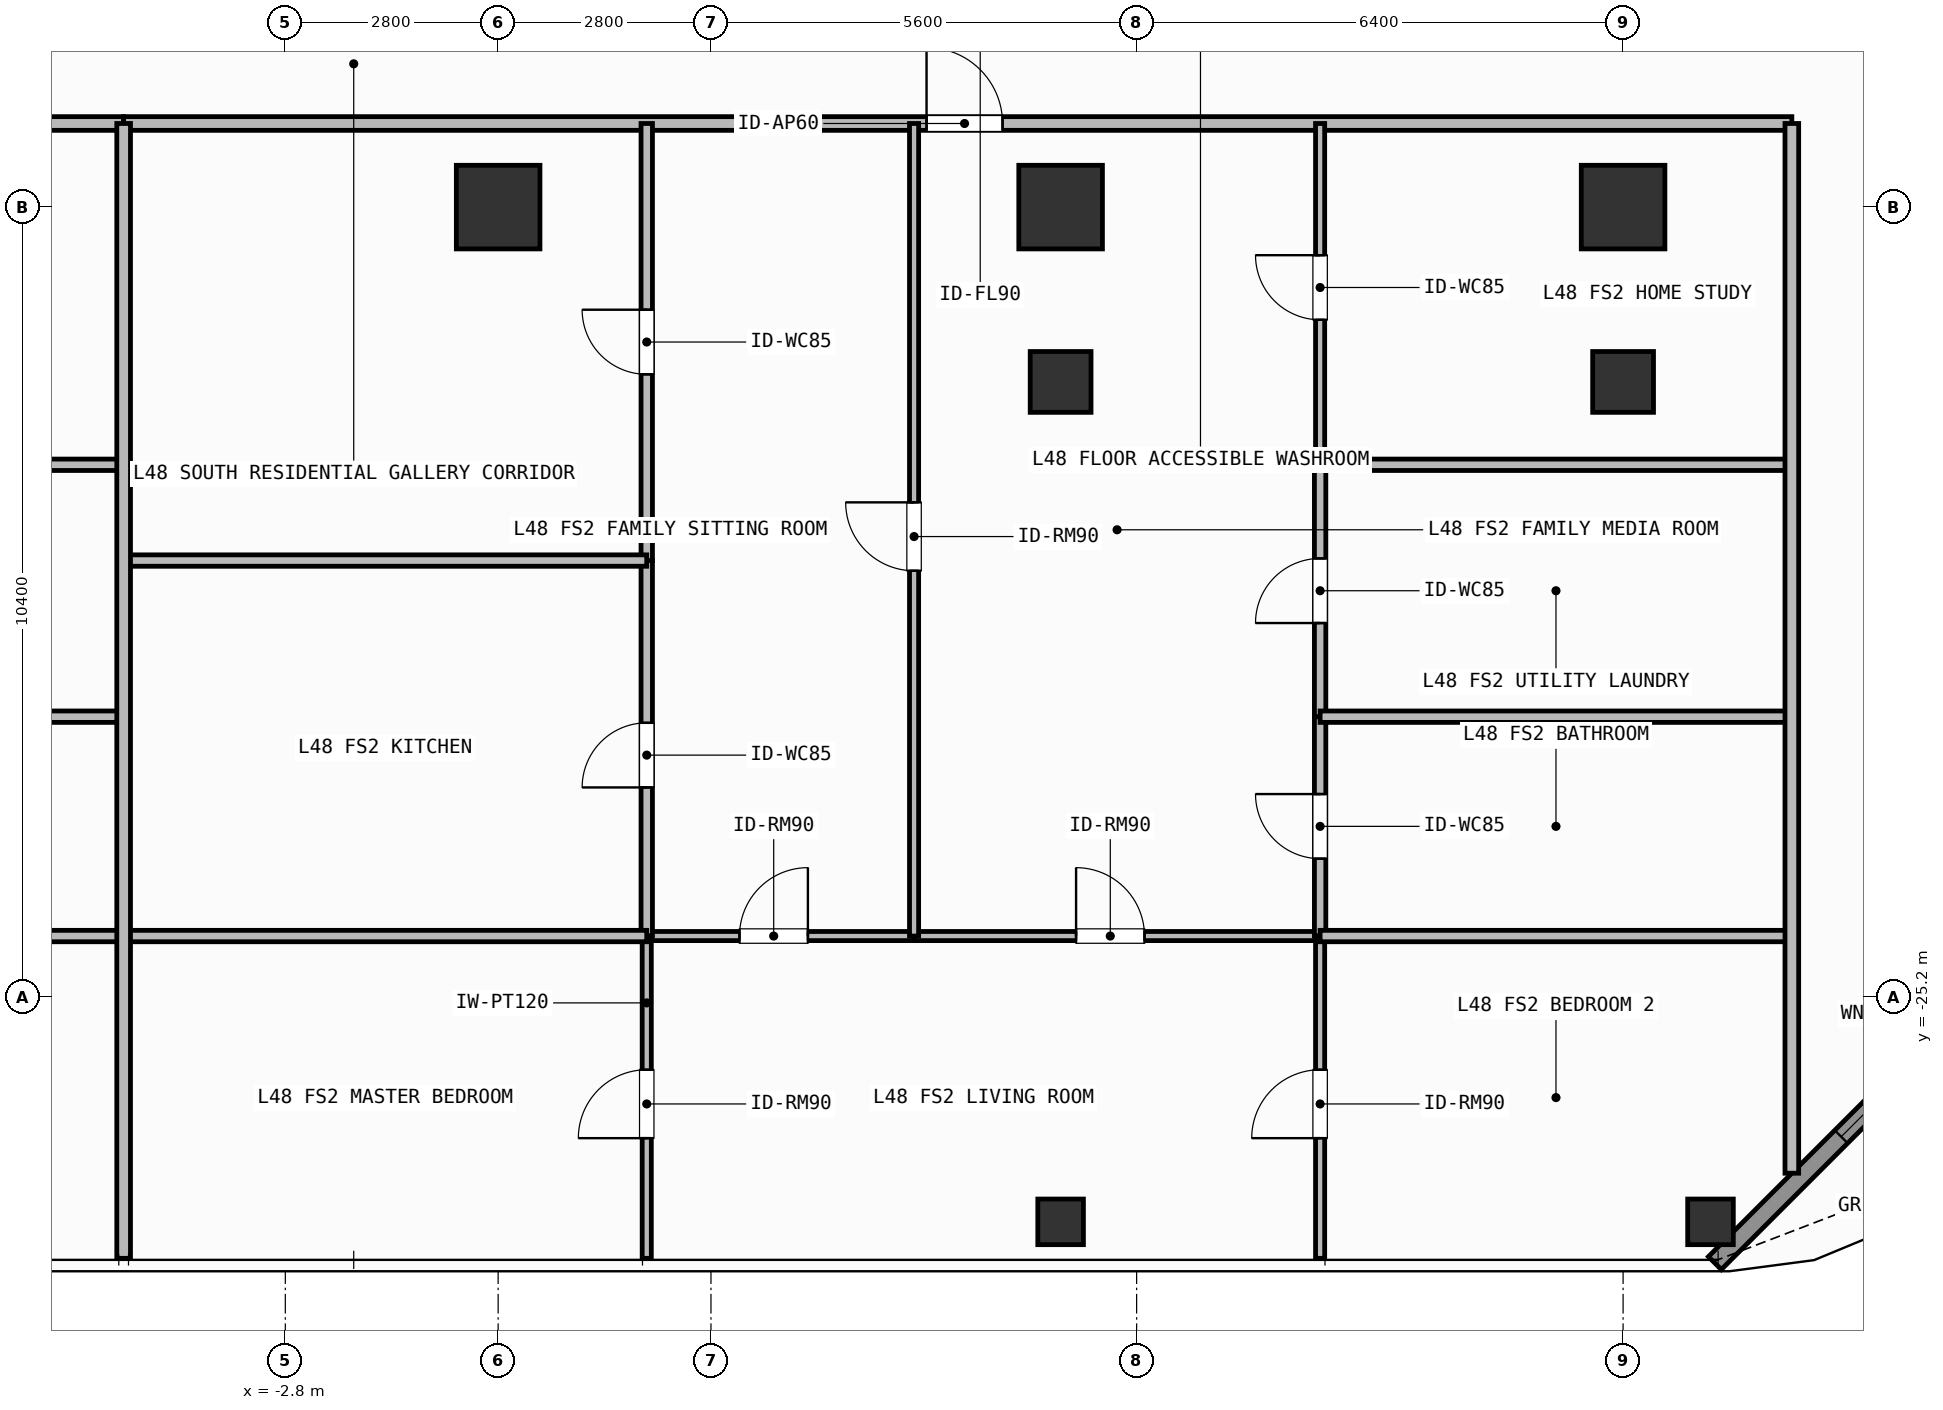
"""IFC4 building model, lengths in metres.
Left out: names, types, materials, properties, quantities, classifications, styles, units other than length and angle.
Written with IfcOpenShell. Run it as: python <this file> out.ifc"""

import sys

from ifc_helpers import new_model, si_unit, direction, frame, frame_2d, origin, origin_2d, place, context, subcontext, project, spatial, rectangle, hollow_rectangle, extrude, element, fill, save


model = new_model("IFC4")
c1 = context("Model", 3, precision=1e-05, world=origin(), true_north=direction((0.0, 1.0)))
c2 = subcontext(c1, "Body", "Model", "MODEL_VIEW")
j1 = project(units=[si_unit("LENGTHUNIT", "METRE"), si_unit("PLANEANGLEUNIT", "RADIAN")], contexts=[c1])
p1 = place(None, origin())
s1 = spatial("IfcSite", under=j1, at=p1, CompositionType="ELEMENT")
p2 = place(p1, origin())
s2 = spatial("IfcBuilding", under=s1, at=p2, CompositionType="ELEMENT")
p3 = place(p2, frame((0.0, 0.0, 195.3)))
s3 = spatial("IfcBuildingStorey", under=s2, at=p3, CompositionType="ELEMENT", Elevation=195.3)
for number, where, z_axis, x_axis in (
    (1, (0.0, -14.8, 0.0), (0.0, 0.0, 1.0), (1.0, 0.0, 0.0)),
    (2, (7.4, -14.8, 0.0), (0.0, 0.0, 1.0), (1.0, 0.0, 0.0)),
    (3, (14.8, -14.8, 0.0), (0.0, 0.0, 1.0), (1.0, 0.0, 0.0)),
):
    element("IfcColumn", number, at=place(p3, frame(where, z_axis=z_axis, x_axis=x_axis)), inside=s3, PredefinedType="COLUMN", context=c2, shape_type="SweptSolid", body=[
        extrude(rectangle(XDim=1.1, YDim=1.1, at=origin_2d()), origin(), (0.0, 0.0, 1.0), 3.9),
    ])
for number, where, z_axis, x_axis in (
    (4, (7.4, -17.1, 0.0), (0.0, 0.0, 1.0), (1.0, 0.0, 0.0)),
    (5, (14.8, -17.1, 0.0), (0.0, 0.0, 1.0), (1.0, 0.0, 0.0)),
):
    element("IfcColumn", number, at=place(p3, frame(where, z_axis=z_axis, x_axis=x_axis)), inside=s3, PredefinedType="COLUMN", context=c2, shape_type="SweptSolid", body=[
        extrude(hollow_rectangle(XDim=0.8, YDim=0.8, WallThickness=0.036, at=origin_2d()), origin(), (0.0, 0.0, 1.0), 3.9),
    ])
for number, where, z_axis, x_axis in (
    (6, (15.95, -28.15, 0.0), (0.0, 0.0, 1.0), (1.0, 0.0, 0.0)),
    (7, (7.4, -28.15, 0.0), (0.0, 0.0, 1.0), (1.0, 0.0, 0.0)),
):
    element("IfcColumn", number, at=place(p3, frame(where, z_axis=z_axis, x_axis=x_axis)), inside=s3, PredefinedType="COLUMN", context=c2, shape_type="SweptSolid", body=[
        extrude(hollow_rectangle(XDim=0.6, YDim=0.6, WallThickness=0.028, at=origin_2d()), origin(), (0.0, 0.0, 1.0), 3.9),
    ])
p4 = place(p3, frame((20.392, -24.308, 0.0), z_axis=(0.0, 0.0, 1.0), x_axis=(-0.707106781187, -0.707106781187, 0.0)))
e8 = element("IfcWall", 8, at=p4, inside=s3, PredefinedType="SOLIDWALL", context=c2, shape_type="SweptSolid", body=[
    extrude(rectangle(XDim=6.201, YDim=0.24, at=frame_2d((3.101, 0.0))), origin(), (0.0, 0.0, 1.0), 3.68),
])
p5 = place(p4, frame((2.351, 0.0, 0.8)))
e9 = element("IfcOpeningElement", 9, at=p5, cuts=e8, PredefinedType="OPENING", context=c2, shape_type="SweptSolid", body=[
    extrude(rectangle(XDim=1.5, YDim=1.85, at=frame_2d((0.75, 0.925))), frame((0.0, 0.13, 0.0), z_axis=(0.0, -1.0, 0.0), x_axis=(1.0, 0.0, 0.0)), (0.0, 0.0, 1.0), 0.26),
])
p6 = place(p3, frame((-20.82, -13.7, 0.0), z_axis=(0.0, 0.0, 1.0), x_axis=(1.0, 0.0, 0.0)))
e10 = element("IfcWall", 10, at=p6, inside=s3, PredefinedType="PARTITIONING", context=c2, shape_type="SweptSolid", body=[
    extrude(rectangle(XDim=15.893, YDim=0.18, at=frame_2d((7.947, 0.0))), origin(), (0.0, 0.0, 1.0), 3.68),
])
p7 = place(p6, frame((6.997, 0.0, 0.0)))
e11 = element("IfcOpeningElement", 11, at=p7, cuts=e10, PredefinedType="OPENING", context=c2, shape_type="SweptSolid", body=[
    extrude(rectangle(XDim=1.0, YDim=2.2, at=frame_2d((0.5, 1.1))), frame((0.0, 0.1, 0.0), z_axis=(0.0, -1.0, 0.0), x_axis=(1.0, 0.0, 0.0)), (0.0, 0.0, 1.0), 0.2),
])
p8 = place(p3, frame((-4.927, -13.7, 0.0), z_axis=(0.0, 0.0, 1.0), x_axis=(1.0, 0.0, 0.0)))
e12 = element("IfcWall", 12, at=p8, inside=s3, PredefinedType="PARTITIONING", context=c2, shape_type="SweptSolid", body=[
    extrude(rectangle(XDim=21.947, YDim=0.18, at=frame_2d((10.974, 0.0))), origin(), (0.0, 0.0, 1.0), 3.68),
])
p9 = place(p8, frame((10.563, 0.0, 0.0)))
e13 = element("IfcOpeningElement", 13, at=p9, cuts=e12, PredefinedType="OPENING", context=c2, shape_type="SweptSolid", body=[
    extrude(rectangle(XDim=1.0, YDim=2.2, at=frame_2d((0.5, 1.1))), frame((0.0, 0.1, 0.0), z_axis=(0.0, -1.0, 0.0), x_axis=(1.0, 0.0, 0.0)), (0.0, 0.0, 1.0), 0.2),
])
p10 = place(p3, frame((1.955, -24.39, 0.0), z_axis=(0.0, 0.0, 1.0), x_axis=(1.0, 0.0, 0.0)))
e14 = element("IfcWall", 14, at=p10, inside=s3, PredefinedType="PARTITIONING", context=c2, shape_type="SweptSolid", body=[
    extrude(rectangle(XDim=3.517, YDim=0.12, at=frame_2d((1.758, 0.0))), origin(), (0.0, 0.0, 1.0), 3.68),
])
p11 = place(p10, frame((1.22, 0.0, 0.0)))
e15 = element("IfcOpeningElement", 15, at=p11, cuts=e14, PredefinedType="OPENING", context=c2, shape_type="SweptSolid", body=[
    extrude(rectangle(XDim=0.9, YDim=2.1, at=frame_2d((0.45, 1.05))), frame((0.0, 0.07, 0.0), z_axis=(0.0, -1.0, 0.0), x_axis=(1.0, 0.0, 0.0)), (0.0, 0.0, 1.0), 0.14),
])
p12 = place(p3, frame((5.472, -24.39, 0.0), z_axis=(0.0, 0.0, 1.0), x_axis=(1.0, 0.0, 0.0)))
e16 = element("IfcWall", 16, at=p12, inside=s3, PredefinedType="PARTITIONING", context=c2, shape_type="SweptSolid", body=[
    extrude(rectangle(XDim=5.342, YDim=0.12, at=frame_2d((2.671, 0.0))), origin(), (0.0, 0.0, 1.0), 3.68),
])
p13 = place(p12, frame((2.131, 0.0, 0.0)))
e17 = element("IfcOpeningElement", 17, at=p13, cuts=e16, PredefinedType="OPENING", context=c2, shape_type="SweptSolid", body=[
    extrude(rectangle(XDim=0.9, YDim=2.1, at=frame_2d((0.45, 1.05))), frame((0.0, 0.07, 0.0), z_axis=(0.0, -1.0, 0.0), x_axis=(1.0, 0.0, 0.0)), (0.0, 0.0, 1.0), 0.14),
])
p14 = place(p3, frame((5.472, -24.39, 0.0), z_axis=(0.0, 0.0, 1.0), x_axis=(0.0, 1.0, 0.0)))
e18 = element("IfcWall", 18, at=p14, inside=s3, PredefinedType="PARTITIONING", context=c2, shape_type="SweptSolid", body=[
    extrude(rectangle(XDim=10.69, YDim=0.12, at=frame_2d((5.345, 0.0))), origin(), (0.0, 0.0, 1.0), 3.68),
])
p15 = place(p14, frame((4.806, 0.0, 0.0)))
e19 = element("IfcOpeningElement", 19, at=p15, cuts=e18, PredefinedType="OPENING", context=c2, shape_type="SweptSolid", body=[
    extrude(rectangle(XDim=0.9, YDim=2.1, at=frame_2d((0.45, 1.05))), frame((0.0, 0.07, 0.0), z_axis=(0.0, -1.0, 0.0), x_axis=(1.0, 0.0, 0.0)), (0.0, 0.0, 1.0), 0.14),
])
p16 = place(p3, frame((1.955, -24.39, 0.0), z_axis=(0.0, 0.0, 1.0), x_axis=(0.0, 1.0, 0.0)))
e20 = element("IfcWall", 20, at=p16, inside=s3, PredefinedType="PARTITIONING", context=c2, shape_type="SweptSolid", body=[
    extrude(rectangle(XDim=4.94, YDim=0.15, at=frame_2d((2.47, 0.0))), origin(), (0.0, 0.0, 1.0), 3.68),
])
p17 = place(p16, frame((1.955, 0.0, 0.0)))
e21 = element("IfcOpeningElement", 21, at=p17, cuts=e20, PredefinedType="OPENING", context=c2, shape_type="SweptSolid", body=[
    extrude(rectangle(XDim=0.85, YDim=2.1, at=frame_2d((0.425, 1.05))), frame((0.0, 0.085, 0.0), z_axis=(0.0, -1.0, 0.0), x_axis=(1.0, 0.0, 0.0)), (0.0, 0.0, 1.0), 0.17),
])
p18 = place(p3, frame((1.955, -19.45, 0.0), z_axis=(0.0, 0.0, 1.0), x_axis=(0.0, 1.0, 0.0)))
e22 = element("IfcWall", 22, at=p18, inside=s3, PredefinedType="PARTITIONING", context=c2, shape_type="SweptSolid", body=[
    extrude(rectangle(XDim=5.75, YDim=0.15, at=frame_2d((2.875, 0.0))), origin(), (0.0, 0.0, 1.0), 3.68),
])
p19 = place(p18, frame((2.45, 0.0, 0.0)))
e23 = element("IfcOpeningElement", 23, at=p19, cuts=e22, PredefinedType="OPENING", context=c2, shape_type="SweptSolid", body=[
    extrude(rectangle(XDim=0.85, YDim=2.1, at=frame_2d((0.425, 1.05))), frame((0.0, 0.085, 0.0), z_axis=(0.0, -1.0, 0.0), x_axis=(1.0, 0.0, 0.0)), (0.0, 0.0, 1.0), 0.17),
])
p20 = place(p3, frame((1.955, -28.63, 0.0), z_axis=(0.0, 0.0, 1.0), x_axis=(0.0, 1.0, 0.0)))
e24 = element("IfcWall", 24, at=p20, inside=s3, PredefinedType="PARTITIONING", context=c2, shape_type="SweptSolid", body=[
    extrude(rectangle(XDim=4.24, YDim=0.12, at=frame_2d((2.12, 0.0))), origin(), (0.0, 0.0, 1.0), 3.68),
])
p21 = place(p20, frame((1.581, 0.0, 0.0)))
e25 = element("IfcOpeningElement", 25, at=p21, cuts=e24, PredefinedType="OPENING", context=c2, shape_type="SweptSolid", body=[
    extrude(rectangle(XDim=0.9, YDim=2.1, at=frame_2d((0.45, 1.05))), frame((0.0, 0.07, 0.0), z_axis=(0.0, -1.0, 0.0), x_axis=(1.0, 0.0, 0.0)), (0.0, 0.0, 1.0), 0.14),
])
p22 = place(p3, frame((10.814, -24.39, 0.0), z_axis=(0.0, 0.0, 1.0), x_axis=(0.0, 1.0, 0.0)))
e26 = element("IfcWall", 26, at=p22, inside=s3, PredefinedType="PARTITIONING", context=c2, shape_type="SweptSolid", body=[
    extrude(rectangle(XDim=2.886, YDim=0.15, at=frame_2d((1.443, 0.0))), origin(), (0.0, 0.0, 1.0), 3.68),
])
p23 = place(p22, frame((1.018, 0.0, 0.0)))
e27 = element("IfcOpeningElement", 27, at=p23, cuts=e26, PredefinedType="OPENING", context=c2, shape_type="SweptSolid", body=[
    extrude(rectangle(XDim=0.85, YDim=2.1, at=frame_2d((0.425, 1.05))), frame((0.0, 0.085, 0.0), z_axis=(0.0, -1.0, 0.0), x_axis=(1.0, 0.0, 0.0)), (0.0, 0.0, 1.0), 0.17),
])
p24 = place(p3, frame((10.814, -21.504, 0.0), z_axis=(0.0, 0.0, 1.0), x_axis=(0.0, 1.0, 0.0)))
e28 = element("IfcWall", 28, at=p24, inside=s3, PredefinedType="PARTITIONING", context=c2, shape_type="SweptSolid", body=[
    extrude(rectangle(XDim=3.314, YDim=0.15, at=frame_2d((1.657, 0.0))), origin(), (0.0, 0.0, 1.0), 3.68),
])
p25 = place(p24, frame((1.232, 0.0, 0.0)))
e29 = element("IfcOpeningElement", 29, at=p25, cuts=e28, PredefinedType="OPENING", context=c2, shape_type="SweptSolid", body=[
    extrude(rectangle(XDim=0.85, YDim=2.1, at=frame_2d((0.425, 1.05))), frame((0.0, 0.085, 0.0), z_axis=(0.0, -1.0, 0.0), x_axis=(1.0, 0.0, 0.0)), (0.0, 0.0, 1.0), 0.17),
])
p26 = place(p3, frame((10.814, -18.19, 0.0), z_axis=(0.0, 0.0, 1.0), x_axis=(0.0, 1.0, 0.0)))
e30 = element("IfcWall", 30, at=p26, inside=s3, PredefinedType="PARTITIONING", context=c2, shape_type="SweptSolid", body=[
    extrude(rectangle(XDim=4.49, YDim=0.12, at=frame_2d((2.245, 0.0))), origin(), (0.0, 0.0, 1.0), 3.68),
])
p27 = place(p26, frame((1.907, 0.0, 0.0)))
e31 = element("IfcOpeningElement", 31, at=p27, cuts=e30, PredefinedType="OPENING", context=c2, shape_type="SweptSolid", body=[
    extrude(rectangle(XDim=0.85, YDim=2.1, at=frame_2d((0.425, 1.05))), frame((0.0, 0.07, 0.0), z_axis=(0.0, -1.0, 0.0), x_axis=(1.0, 0.0, 0.0)), (0.0, 0.0, 1.0), 0.14),
])
p28 = place(p3, frame((10.814, -28.63, 0.0), z_axis=(0.0, 0.0, 1.0), x_axis=(0.0, 1.0, 0.0)))
e32 = element("IfcWall", 32, at=p28, inside=s3, PredefinedType="PARTITIONING", context=c2, shape_type="SweptSolid", body=[
    extrude(rectangle(XDim=4.24, YDim=0.12, at=frame_2d((2.12, 0.0))), origin(), (0.0, 0.0, 1.0), 3.68),
])
p29 = place(p28, frame((1.581, 0.0, 0.0)))
e33 = element("IfcOpeningElement", 33, at=p29, cuts=e32, PredefinedType="OPENING", context=c2, shape_type="SweptSolid", body=[
    extrude(rectangle(XDim=0.9, YDim=2.1, at=frame_2d((0.45, 1.05))), frame((0.0, 0.07, 0.0), z_axis=(0.0, -1.0, 0.0), x_axis=(1.0, 0.0, 0.0)), (0.0, 0.0, 1.0), 0.14),
])
for number, where, z_axis, x_axis in (
    (34, (-9.885, -21.504, 0.0), (0.0, 0.0, 1.0), (1.0, 0.0, 0.0)),
    (35, (-9.885, -18.19, 0.0), (0.0, 0.0, 1.0), (1.0, 0.0, 0.0)),
    (36, (-9.885, -24.39, 0.0), (0.0, 0.0, 1.0), (1.0, 0.0, 0.0)),
):
    element("IfcWall", number, at=place(p3, frame(where, z_axis=z_axis, x_axis=x_axis)), inside=s3, PredefinedType="PARTITIONING", context=c2, shape_type="SweptSolid", body=[
        extrude(rectangle(XDim=4.958, YDim=0.15, at=frame_2d((2.479, 0.0))), origin(), (0.0, 0.0, 1.0), 3.68),
    ])
for number, where, z_axis, x_axis in (
    (37, (-4.927, -19.45, 0.0), (0.0, 0.0, 1.0), (1.0, 0.0, 0.0)),
    (38, (-4.927, -24.39, 0.0), (0.0, 0.0, 1.0), (1.0, 0.0, 0.0)),
):
    element("IfcWall", number, at=place(p3, frame(where, z_axis=z_axis, x_axis=x_axis)), inside=s3, PredefinedType="PARTITIONING", context=c2, shape_type="SweptSolid", body=[
        extrude(rectangle(XDim=6.882, YDim=0.15, at=frame_2d((3.441, 0.0))), origin(), (0.0, 0.0, 1.0), 3.68),
    ])
p30 = place(p3, frame((10.814, -21.504, 0.0), z_axis=(0.0, 0.0, 1.0), x_axis=(1.0, 0.0, 0.0)))
e39 = element("IfcWall", 39, at=p30, inside=s3, PredefinedType="PARTITIONING", context=c2, shape_type="SweptSolid", body=[
    extrude(rectangle(XDim=6.206, YDim=0.15, at=frame_2d((3.103, 0.0))), origin(), (0.0, 0.0, 1.0), 3.42),
])
for number, where, z_axis, x_axis in (
    (40, (10.814, -18.19, 0.0), (0.0, 0.0, 1.0), (1.0, 0.0, 0.0)),
    (41, (10.814, -24.39, 0.0), (0.0, 0.0, 1.0), (1.0, 0.0, 0.0)),
):
    element("IfcWall", number, at=place(p3, frame(where, z_axis=z_axis, x_axis=x_axis)), inside=s3, PredefinedType="PARTITIONING", context=c2, shape_type="SweptSolid", body=[
        extrude(rectangle(XDim=6.206, YDim=0.15, at=frame_2d((3.103, 0.0))), origin(), (0.0, 0.0, 1.0), 3.68),
    ])
p31 = place(p3, frame((-4.927, -28.63, 0.0), z_axis=(0.0, 0.0, 1.0), x_axis=(0.0, 1.0, 0.0)))
e42 = element("IfcWall", 42, at=p31, inside=s3, PredefinedType="PARTITIONING", context=c2, shape_type="SweptSolid", body=[
    extrude(rectangle(XDim=14.93, YDim=0.18, at=frame_2d((7.465, 0.0))), origin(), (0.0, 0.0, 1.0), 3.68),
])
p32 = place(p3, frame((17.02, -27.51, 0.0), z_axis=(0.0, 0.0, 1.0), x_axis=(0.0, 1.0, 0.0)))
e43 = element("IfcWall", 43, at=p32, inside=s3, PredefinedType="PARTITIONING", context=c2, shape_type="SweptSolid", body=[
    extrude(rectangle(XDim=13.81, YDim=0.18, at=frame_2d((6.905, 0.0))), origin(), (0.0, 0.0, 1.0), 3.68),
])
p33 = place(p5, origin())
e44 = element("IfcWindow", 44, at=p33, inside=s3, PartitioningType="SINGLE_PANEL", PredefinedType="WINDOW", context=c2, shape_type="SweptSolid", body=[
    extrude(rectangle(XDim=1.5, YDim=1.85, at=frame_2d((0.75, 0.925))), frame((0.0, 0.03, 0.0), z_axis=(0.0, -1.0, 0.0), x_axis=(1.0, 0.0, 0.0)), (0.0, 0.0, 1.0), 0.06),
])
fill(e9, e44)
p34 = place(p9, origin())
e45 = element("IfcDoor", 45, at=p34, inside=s3, OperationType="SINGLE_SWING_LEFT", PredefinedType="DOOR", context=c2, shape_type="SweptSolid", body=[
    extrude(rectangle(XDim=1.0, YDim=2.2, at=frame_2d((0.5, 1.1))), frame((0.0, 0.025, 0.0), z_axis=(0.0, -1.0, 0.0), x_axis=(1.0, 0.0, 0.0)), (0.0, 0.0, 1.0), 0.05),
])
fill(e13, e45)
p35 = place(p11, origin())
e46 = element("IfcDoor", 46, at=p35, inside=s3, OperationType="SINGLE_SWING_RIGHT", PredefinedType="DOOR", context=c2, shape_type="SweptSolid", body=[
    extrude(rectangle(XDim=0.9, YDim=2.1, at=frame_2d((0.45, 1.05))), frame((0.0, 0.025, 0.0), z_axis=(0.0, -1.0, 0.0), x_axis=(1.0, 0.0, 0.0)), (0.0, 0.0, 1.0), 0.05),
])
fill(e15, e46)
p36 = place(p13, origin())
e47 = element("IfcDoor", 47, at=p36, inside=s3, OperationType="SINGLE_SWING_LEFT", PredefinedType="DOOR", context=c2, shape_type="SweptSolid", body=[
    extrude(rectangle(XDim=0.9, YDim=2.1, at=frame_2d((0.45, 1.05))), frame((0.0, 0.025, 0.0), z_axis=(0.0, -1.0, 0.0), x_axis=(1.0, 0.0, 0.0)), (0.0, 0.0, 1.0), 0.05),
])
fill(e17, e47)
p37 = place(p15, origin())
e48 = element("IfcDoor", 48, at=p37, inside=s3, OperationType="SINGLE_SWING_RIGHT", PredefinedType="DOOR", context=c2, shape_type="SweptSolid", body=[
    extrude(rectangle(XDim=0.9, YDim=2.1, at=frame_2d((0.45, 1.05))), frame((0.0, 0.025, 0.0), z_axis=(0.0, -1.0, 0.0), x_axis=(1.0, 0.0, 0.0)), (0.0, 0.0, 1.0), 0.05),
])
fill(e19, e48)
p38 = place(p17, origin())
e49 = element("IfcDoor", 49, at=p38, inside=s3, OperationType="SINGLE_SWING_LEFT", PredefinedType="DOOR", context=c2, shape_type="SweptSolid", body=[
    extrude(rectangle(XDim=0.85, YDim=2.1, at=frame_2d((0.425, 1.05))), frame((0.0, 0.025, 0.0), z_axis=(0.0, -1.0, 0.0), x_axis=(1.0, 0.0, 0.0)), (0.0, 0.0, 1.0), 0.05),
])
fill(e21, e49)
p39 = place(p19, origin())
e50 = element("IfcDoor", 50, at=p39, inside=s3, OperationType="SINGLE_SWING_RIGHT", PredefinedType="DOOR", context=c2, shape_type="SweptSolid", body=[
    extrude(rectangle(XDim=0.85, YDim=2.1, at=frame_2d((0.425, 1.05))), frame((0.0, 0.025, 0.0), z_axis=(0.0, -1.0, 0.0), x_axis=(1.0, 0.0, 0.0)), (0.0, 0.0, 1.0), 0.05),
])
fill(e23, e50)
p40 = place(p21, origin())
e51 = element("IfcDoor", 51, at=p40, inside=s3, OperationType="SINGLE_SWING_LEFT", PredefinedType="DOOR", context=c2, shape_type="SweptSolid", body=[
    extrude(rectangle(XDim=0.9, YDim=2.1, at=frame_2d((0.45, 1.05))), frame((0.0, 0.025, 0.0), z_axis=(0.0, -1.0, 0.0), x_axis=(1.0, 0.0, 0.0)), (0.0, 0.0, 1.0), 0.05),
])
fill(e25, e51)
p41 = place(p23, origin())
e52 = element("IfcDoor", 52, at=p41, inside=s3, OperationType="SINGLE_SWING_RIGHT", PredefinedType="DOOR", context=c2, shape_type="SweptSolid", body=[
    extrude(rectangle(XDim=0.85, YDim=2.1, at=frame_2d((0.425, 1.05))), frame((0.0, 0.025, 0.0), z_axis=(0.0, -1.0, 0.0), x_axis=(1.0, 0.0, 0.0)), (0.0, 0.0, 1.0), 0.05),
])
fill(e27, e52)
p42 = place(p25, origin())
e53 = element("IfcDoor", 53, at=p42, inside=s3, OperationType="SINGLE_SWING_LEFT", PredefinedType="DOOR", context=c2, shape_type="SweptSolid", body=[
    extrude(rectangle(XDim=0.85, YDim=2.1, at=frame_2d((0.425, 1.05))), frame((0.0, 0.025, 0.0), z_axis=(0.0, -1.0, 0.0), x_axis=(1.0, 0.0, 0.0)), (0.0, 0.0, 1.0), 0.05),
])
fill(e29, e53)
p43 = place(p27, origin())
e54 = element("IfcDoor", 54, at=p43, inside=s3, OperationType="SINGLE_SWING_RIGHT", PredefinedType="DOOR", context=c2, shape_type="SweptSolid", body=[
    extrude(rectangle(XDim=0.85, YDim=2.1, at=frame_2d((0.425, 1.05))), frame((0.0, 0.025, 0.0), z_axis=(0.0, -1.0, 0.0), x_axis=(1.0, 0.0, 0.0)), (0.0, 0.0, 1.0), 0.05),
])
fill(e31, e54)
p44 = place(p29, origin())
e55 = element("IfcDoor", 55, at=p44, inside=s3, OperationType="SINGLE_SWING_LEFT", PredefinedType="DOOR", context=c2, shape_type="SweptSolid", body=[
    extrude(rectangle(XDim=0.9, YDim=2.1, at=frame_2d((0.45, 1.05))), frame((0.0, 0.025, 0.0), z_axis=(0.0, -1.0, 0.0), x_axis=(1.0, 0.0, 0.0)), (0.0, 0.0, 1.0), 0.05),
])
fill(e33, e55)
save(model, sys.argv[1])
